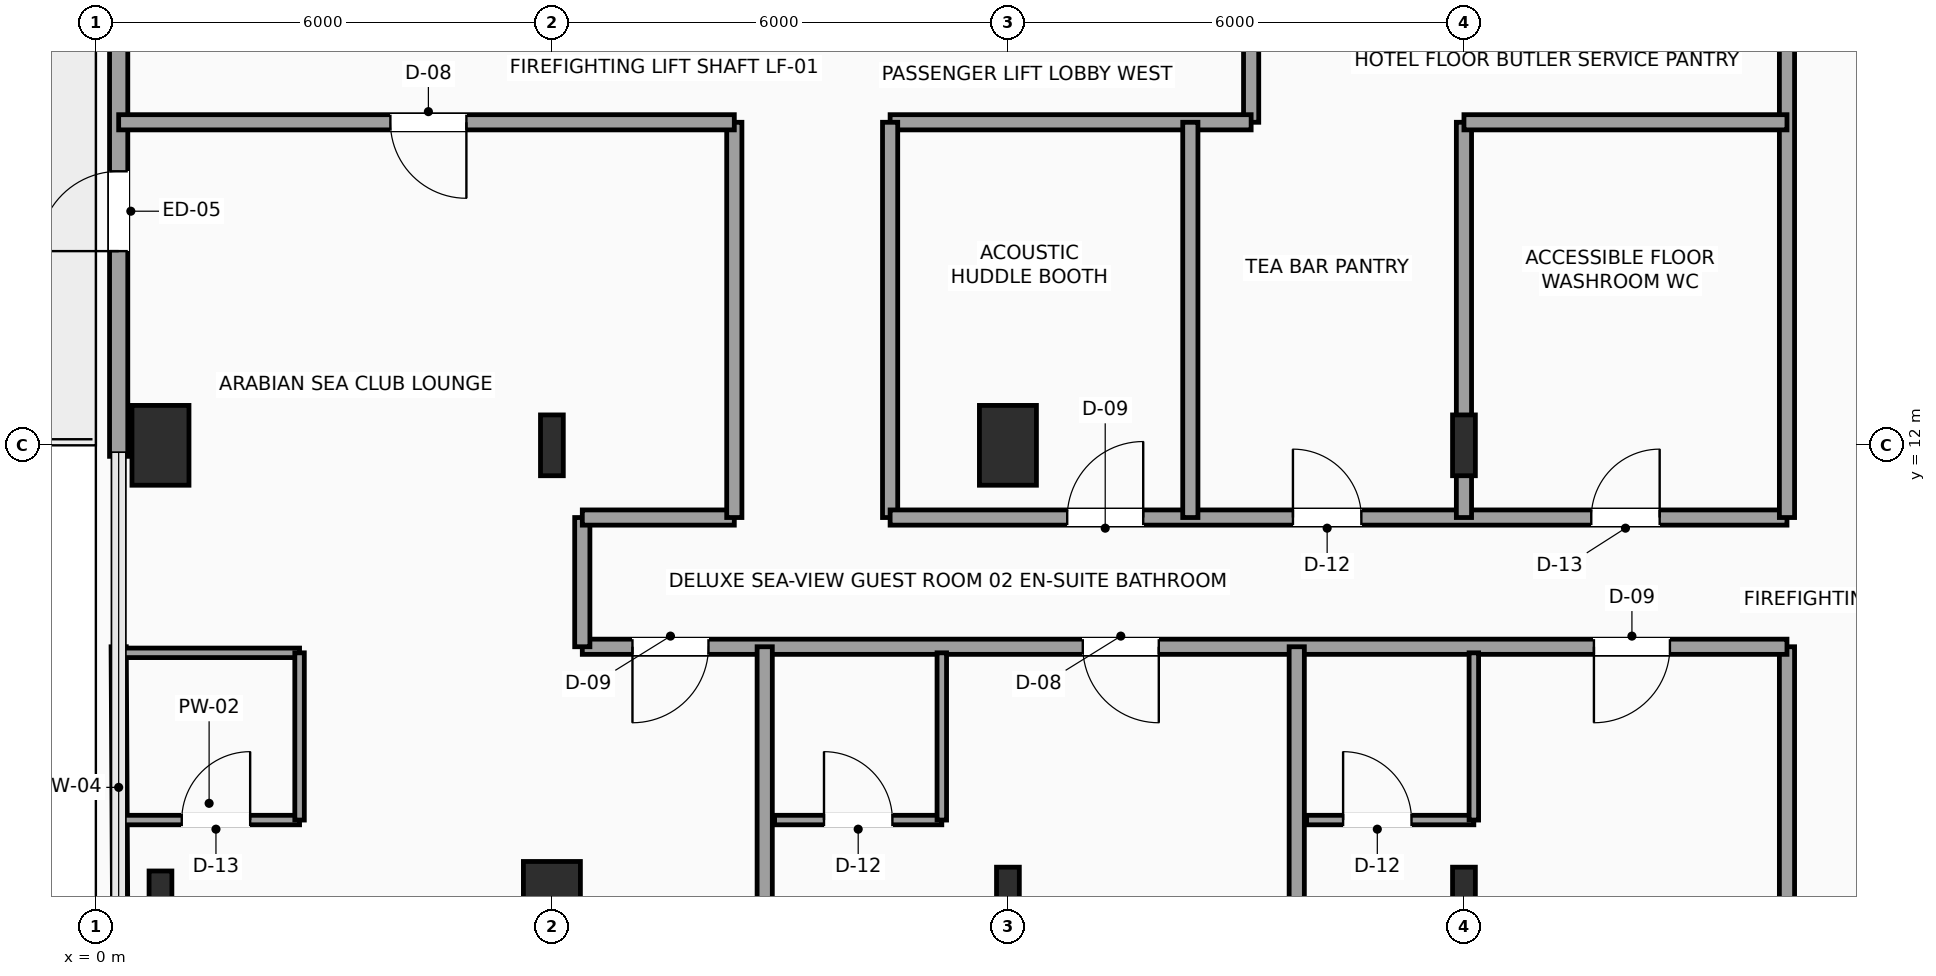
"""IFC4 building model, lengths in metres.
Left out: names, types, materials, properties, quantities, classifications, styles, units other than length and angle.
Written with IfcOpenShell. Run it as: python <this file> out.ifc"""

import sys

from ifc_helpers import new_model, si_unit, direction, frame, frame_2d, origin, origin_2d, place, context, subcontext, project, spatial, rectangle, i_section, extrude, element, fill, save


model = new_model("IFC4")
c1 = context("Model", 3, precision=1e-05, world=origin(), true_north=direction((0.0, 1.0)))
c2 = subcontext(c1, "Body", "Model", "MODEL_VIEW")
j1 = project(units=[si_unit("LENGTHUNIT", "METRE"), si_unit("PLANEANGLEUNIT", "RADIAN")], contexts=[c1])
p1 = place(None, origin())
s1 = spatial("IfcSite", under=j1, at=p1, CompositionType="ELEMENT")
p2 = place(p1, origin())
s2 = spatial("IfcBuilding", under=s1, at=p2, CompositionType="ELEMENT")
p3 = place(p2, frame((0.0, 0.0, 172.95)))
s3 = spatial("IfcBuildingStorey", under=s2, at=p3, CompositionType="ELEMENT", Elevation=172.95)
p4 = place(p3, frame((0.85, 6.0, 0.0), z_axis=(0.0, 0.0, 1.0), x_axis=(1.0, 0.0, 0.0)))
e1 = element("IfcColumn", 1, at=p4, inside=s3, PredefinedType="COLUMN", context=c2, shape_type="SweptSolid", body=[
    extrude(i_section(OverallWidth=0.3, OverallDepth=0.8, WebThickness=0.018, FlangeThickness=0.033, FilletRadius=0.03, at=origin_2d()), origin(), (0.0, 0.0, 1.0), 3.75),
])
for number, where, z_axis, x_axis in (
    (2, (0.85, 12.0, 0.0), (0.0, 0.0, 1.0), (1.0, 0.0, 0.0)),
    (3, (6.0, 6.0, 0.0), (0.0, 0.0, 1.0), (1.0, 0.0, 0.0)),
):
    element("IfcColumn", number, at=place(p3, frame(where, z_axis=z_axis, x_axis=x_axis)), inside=s3, PredefinedType="COLUMN", context=c2, shape_type="SweptSolid", body=[
        extrude(rectangle(XDim=0.75, YDim=1.05, at=origin_2d()), origin(), (0.0, 0.0, 1.0), 3.75),
    ])
p5 = place(p3, frame((6.0, 12.0, 0.0), z_axis=(0.0, 0.0, 1.0), x_axis=(1.0, 0.0, 0.0)))
e4 = element("IfcColumn", 4, at=p5, inside=s3, PredefinedType="COLUMN", context=c2, shape_type="SweptSolid", body=[
    extrude(i_section(OverallWidth=0.3, OverallDepth=0.8, WebThickness=0.018, FlangeThickness=0.033, FilletRadius=0.03, at=origin_2d()), origin(), (0.0, 0.0, 1.0), 3.75),
])
p6 = place(p3, frame((12.0, 6.0, 0.0), z_axis=(0.0, 0.0, 1.0), x_axis=(1.0, 0.0, 0.0)))
e5 = element("IfcColumn", 5, at=p6, inside=s3, PredefinedType="COLUMN", context=c2, shape_type="SweptSolid", body=[
    extrude(i_section(OverallWidth=0.3, OverallDepth=0.9, WebThickness=0.019, FlangeThickness=0.035, FilletRadius=0.03, at=origin_2d()), origin(), (0.0, 0.0, 1.0), 3.75),
])
p7 = place(p3, frame((12.0, 12.0, 0.0), z_axis=(0.0, 0.0, 1.0), x_axis=(1.0, 0.0, 0.0)))
e6 = element("IfcColumn", 6, at=p7, inside=s3, PredefinedType="COLUMN", context=c2, shape_type="SweptSolid", body=[
    extrude(rectangle(XDim=0.75, YDim=1.05, at=origin_2d()), origin(), (0.0, 0.0, 1.0), 3.75),
])
p8 = place(p3, frame((18.0, 6.0, 0.0), z_axis=(0.0, 0.0, 1.0), x_axis=(1.0, 0.0, 0.0)))
e7 = element("IfcColumn", 7, at=p8, inside=s3, PredefinedType="COLUMN", context=c2, shape_type="SweptSolid", body=[
    extrude(i_section(OverallWidth=0.3, OverallDepth=0.9, WebThickness=0.019, FlangeThickness=0.035, FilletRadius=0.03, at=origin_2d()), origin(), (0.0, 0.0, 1.0), 3.75),
])
p9 = place(p3, frame((18.0, 12.0, 0.0), z_axis=(0.0, 0.0, 1.0), x_axis=(1.0, 0.0, 0.0)))
e8 = element("IfcColumn", 8, at=p9, inside=s3, PredefinedType="COLUMN", context=c2, shape_type="SweptSolid", body=[
    extrude(i_section(OverallWidth=0.3, OverallDepth=0.8, WebThickness=0.018, FlangeThickness=0.033, FilletRadius=0.03, at=origin_2d()), origin(), (0.0, 0.0, 1.0), 3.75),
])
p10 = place(p3, frame((0.3, 11.855, 0.0), z_axis=(0.0, 0.0, 1.0), x_axis=(0.0, 1.0, 0.0)))
e9 = element("IfcWall", 9, at=p10, inside=s3, PredefinedType="SOLIDWALL", context=c2, shape_type="SweptSolid", body=[
    extrude(rectangle(XDim=9.29, YDim=0.24, at=frame_2d((4.645, 0.0))), origin(), (0.0, 0.0, 1.0), 3.54),
])
p11 = place(p10, frame((2.7, 0.0, 0.0)))
e10 = element("IfcOpeningElement", 10, at=p11, cuts=e9, PredefinedType="OPENING", context=c2, shape_type="SweptSolid", body=[
    extrude(rectangle(XDim=1.05, YDim=2.2, at=frame_2d((0.525, 1.1))), frame((0.0, 0.13, 0.0), z_axis=(0.0, -1.0, 0.0), x_axis=(1.0, 0.0, 0.0)), (0.0, 0.0, 1.0), 0.26),
])
p12 = place(p3, frame((22.25, 5.8, 0.0), z_axis=(0.0, 0.0, 1.0), x_axis=(0.0, 1.0, 0.0)))
e11 = element("IfcWall", 11, at=p12, inside=s3, PredefinedType="PARTITIONING", context=c2, shape_type="SweptSolid", body=[
    extrude(rectangle(XDim=3.55, YDim=0.2, at=frame_2d((1.775, 0.0))), origin(), (0.0, 0.0, 1.0), 3.54),
])
p13 = place(p3, frame((22.25, 9.35, 0.0), z_axis=(0.0, 0.0, 1.0), x_axis=(-1.0, 0.0, 0.0)))
e12 = element("IfcWall", 12, at=p13, inside=s3, PredefinedType="PARTITIONING", context=c2, shape_type="SweptSolid", body=[
    extrude(rectangle(XDim=15.85, YDim=0.2, at=frame_2d((7.925, 0.0))), origin(), (0.0, 0.0, 1.0), 3.54),
])
p14 = place(p13, frame((14.19, 0.0, 0.0)))
e13 = element("IfcOpeningElement", 13, at=p14, cuts=e12, PredefinedType="OPENING", context=c2, shape_type="SweptSolid", body=[
    extrude(rectangle(XDim=1.0, YDim=2.2, at=frame_2d((0.5, 1.1))), frame((0.0, 0.11, 0.0), z_axis=(0.0, -1.0, 0.0), x_axis=(1.0, 0.0, 0.0)), (0.0, 0.0, 1.0), 0.22),
])
p15 = place(p13, frame((8.265, 0.0, 0.0)))
e14 = element("IfcOpeningElement", 14, at=p15, cuts=e12, PredefinedType="OPENING", context=c2, shape_type="SweptSolid", body=[
    extrude(rectangle(XDim=1.0, YDim=2.2, at=frame_2d((0.5, 1.1))), frame((0.0, 0.11, 0.0), z_axis=(0.0, -1.0, 0.0), x_axis=(1.0, 0.0, 0.0)), (0.0, 0.0, 1.0), 0.22),
])
p16 = place(p13, frame((1.54, 0.0, 0.0)))
e15 = element("IfcOpeningElement", 15, at=p16, cuts=e12, PredefinedType="OPENING", context=c2, shape_type="SweptSolid", body=[
    extrude(rectangle(XDim=1.0, YDim=2.2, at=frame_2d((0.5, 1.1))), frame((0.0, 0.11, 0.0), z_axis=(0.0, -1.0, 0.0), x_axis=(1.0, 0.0, 0.0)), (0.0, 0.0, 1.0), 0.22),
])
p17 = place(p3, frame((6.4, 9.35, 0.0), z_axis=(0.0, 0.0, 1.0), x_axis=(0.0, 1.0, 0.0)))
e16 = element("IfcWall", 16, at=p17, inside=s3, PredefinedType="PARTITIONING", context=c2, shape_type="SweptSolid", body=[
    extrude(rectangle(XDim=1.7, YDim=0.2, at=frame_2d((0.85, 0.0))), origin(), (0.0, 0.0, 1.0), 3.54),
])
p18 = place(p3, frame((6.4, 11.05, 0.0), z_axis=(0.0, 0.0, 1.0), x_axis=(1.0, 0.0, 0.0)))
e17 = element("IfcWall", 17, at=p18, inside=s3, PredefinedType="PARTITIONING", context=c2, shape_type="SweptSolid", body=[
    extrude(rectangle(XDim=2.0, YDim=0.2, at=frame_2d((1.0, 0.0))), origin(), (0.0, 0.0, 1.0), 3.54),
])
p19 = place(p3, frame((8.4, 11.05, 0.0), z_axis=(0.0, 0.0, 1.0), x_axis=(0.0, 1.0, 0.0)))
e18 = element("IfcWall", 18, at=p19, inside=s3, PredefinedType="PARTITIONING", context=c2, shape_type="SweptSolid", body=[
    extrude(rectangle(XDim=5.2, YDim=0.2, at=frame_2d((2.6, 0.0))), origin(), (0.0, 0.0, 1.0), 3.54),
])
p20 = place(p3, frame((8.4, 16.25, 0.0), z_axis=(0.0, 0.0, 1.0), x_axis=(-1.0, 0.0, 0.0)))
e19 = element("IfcWall", 19, at=p20, inside=s3, PredefinedType="PARTITIONING", context=c2, shape_type="SweptSolid", body=[
    extrude(rectangle(XDim=8.1, YDim=0.2, at=frame_2d((4.05, 0.0))), origin(), (0.0, 0.0, 1.0), 3.54),
])
p21 = place(p20, frame((3.525, 0.0, 0.0)))
e20 = element("IfcOpeningElement", 20, at=p21, cuts=e19, PredefinedType="OPENING", context=c2, shape_type="SweptSolid", body=[
    extrude(rectangle(XDim=1.0, YDim=2.2, at=frame_2d((0.5, 1.1))), frame((0.0, 0.11, 0.0), z_axis=(0.0, -1.0, 0.0), x_axis=(1.0, 0.0, 0.0)), (0.0, 0.0, 1.0), 0.22),
])
p22 = place(p3, frame((15.2, 17.95, 0.0), z_axis=(0.0, 0.0, 1.0), x_axis=(0.0, -1.0, 0.0)))
e21 = element("IfcWall", 21, at=p22, inside=s3, PredefinedType="PARTITIONING", context=c2, shape_type="SweptSolid", body=[
    extrude(rectangle(XDim=1.7, YDim=0.2, at=frame_2d((0.85, 0.0))), origin(), (0.0, 0.0, 1.0), 3.54),
])
p23 = place(p3, frame((15.2, 16.25, 0.0), z_axis=(0.0, 0.0, 1.0), x_axis=(-1.0, 0.0, 0.0)))
e22 = element("IfcWall", 22, at=p23, inside=s3, PredefinedType="PARTITIONING", context=c2, shape_type="SweptSolid", body=[
    extrude(rectangle(XDim=4.75, YDim=0.2, at=frame_2d((2.375, 0.0))), origin(), (0.0, 0.0, 1.0), 3.54),
])
p24 = place(p3, frame((10.45, 16.25, 0.0), z_axis=(0.0, 0.0, 1.0), x_axis=(0.0, -1.0, 0.0)))
e23 = element("IfcWall", 23, at=p24, inside=s3, PredefinedType="PARTITIONING", context=c2, shape_type="SweptSolid", body=[
    extrude(rectangle(XDim=5.2, YDim=0.2, at=frame_2d((2.6, 0.0))), origin(), (0.0, 0.0, 1.0), 3.54),
])
p25 = place(p3, frame((10.45, 11.05, 0.0), z_axis=(0.0, 0.0, 1.0), x_axis=(1.0, 0.0, 0.0)))
e24 = element("IfcWall", 24, at=p25, inside=s3, PredefinedType="PARTITIONING", context=c2, shape_type="SweptSolid", body=[
    extrude(rectangle(XDim=11.8, YDim=0.2, at=frame_2d((5.9, 0.0))), origin(), (0.0, 0.0, 1.0), 3.54),
])
p26 = place(p25, frame((2.33, 0.0, 0.0)))
e25 = element("IfcOpeningElement", 25, at=p26, cuts=e24, PredefinedType="OPENING", context=c2, shape_type="SweptSolid", body=[
    extrude(rectangle(XDim=1.0, YDim=2.2, at=frame_2d((0.5, 1.1))), frame((0.0, 0.11, 0.0), z_axis=(0.0, -1.0, 0.0), x_axis=(1.0, 0.0, 0.0)), (0.0, 0.0, 1.0), 0.22),
])
p27 = place(p25, frame((5.3, 0.0, 0.0)))
e26 = element("IfcOpeningElement", 26, at=p27, cuts=e24, PredefinedType="OPENING", context=c2, shape_type="SweptSolid", body=[
    extrude(rectangle(XDim=0.9, YDim=2.1, at=frame_2d((0.45, 1.05))), frame((0.0, 0.11, 0.0), z_axis=(0.0, -1.0, 0.0), x_axis=(1.0, 0.0, 0.0)), (0.0, 0.0, 1.0), 0.22),
])
p28 = place(p25, frame((9.225, 0.0, 0.0)))
e27 = element("IfcOpeningElement", 27, at=p28, cuts=e24, PredefinedType="OPENING", context=c2, shape_type="SweptSolid", body=[
    extrude(rectangle(XDim=0.9, YDim=2.1, at=frame_2d((0.45, 1.05))), frame((0.0, 0.11, 0.0), z_axis=(0.0, -1.0, 0.0), x_axis=(1.0, 0.0, 0.0)), (0.0, 0.0, 1.0), 0.22),
])
p29 = place(p3, frame((22.25, 11.05, 0.0), z_axis=(0.0, 0.0, 1.0), x_axis=(0.0, 1.0, 0.0)))
e28 = element("IfcWall", 28, at=p29, inside=s3, PredefinedType="PARTITIONING", context=c2, shape_type="SweptSolid", body=[
    extrude(rectangle(XDim=19.2, YDim=0.2, at=frame_2d((9.6, 0.0))), origin(), (0.0, 0.0, 1.0), 3.54),
])
p30 = place(p3, frame((14.4, 11.05, 0.0), z_axis=(0.0, 0.0, 1.0), x_axis=(0.0, 1.0, 0.0)))
e29 = element("IfcWall", 29, at=p30, inside=s3, PredefinedType="PARTITIONING", context=c2, shape_type="SweptSolid", body=[
    extrude(rectangle(XDim=5.2, YDim=0.2, at=frame_2d((2.6, 0.0))), origin(), (0.0, 0.0, 1.0), 3.54),
])
p31 = place(p3, frame((18.0, 11.05, 0.0), z_axis=(0.0, 0.0, 1.0), x_axis=(0.0, 1.0, 0.0)))
e30 = element("IfcWall", 30, at=p31, inside=s3, PredefinedType="PARTITIONING", context=c2, shape_type="SweptSolid", body=[
    extrude(rectangle(XDim=5.2, YDim=0.2, at=frame_2d((2.6, 0.0))), origin(), (0.0, 0.0, 1.0), 3.132),
])
p32 = place(p3, frame((18.0, 16.25, 0.0), z_axis=(0.0, 0.0, 1.0), x_axis=(1.0, 0.0, 0.0)))
e31 = element("IfcWall", 31, at=p32, inside=s3, PredefinedType="PARTITIONING", context=c2, shape_type="SweptSolid", body=[
    extrude(rectangle(XDim=4.25, YDim=0.2, at=frame_2d((2.125, 0.0))), origin(), (0.0, 0.0, 1.0), 3.54),
])
p33 = place(p3, frame((0.35, 0.35, 0.0), z_axis=(0.0, 0.0, 1.0), x_axis=(-0.005560894919, 0.999984538104, 0.0)))
e32 = element("IfcWall", 32, at=p33, inside=s3, PredefinedType="PARTITIONING", context=c2, shape_type="SweptSolid", body=[
    extrude(rectangle(XDim=9.0, YDim=0.2, at=frame_2d((4.5, 0.0))), origin(), (0.0, 0.0, 1.0), 3.54),
])
p34 = place(p3, frame((8.8, 0.3, 0.0), z_axis=(0.0, 0.0, 1.0), x_axis=(0.0, 1.0, 0.0)))
e33 = element("IfcWall", 33, at=p34, inside=s3, PredefinedType="PARTITIONING", context=c2, shape_type="SweptSolid", body=[
    extrude(rectangle(XDim=9.05, YDim=0.2, at=frame_2d((4.525, 0.0))), origin(), (0.0, 0.0, 1.0), 3.54),
])
p35 = place(p3, frame((0.3, 7.07, 0.0), z_axis=(0.0, 0.0, 1.0), x_axis=(1.0, 0.0, 0.0)))
e34 = element("IfcWall", 34, at=p35, inside=s3, PredefinedType="PARTITIONING", context=c2, shape_type="SweptSolid", body=[
    extrude(rectangle(XDim=2.38, YDim=0.125, at=frame_2d((1.19, 0.0))), origin(), (0.0, 0.0, 1.0), 3.54),
])
p36 = place(p35, frame((0.83, 0.0, 0.0)))
e35 = element("IfcOpeningElement", 35, at=p36, cuts=e34, PredefinedType="OPENING", context=c2, shape_type="SweptSolid", body=[
    extrude(rectangle(XDim=0.9, YDim=2.1, at=frame_2d((0.45, 1.05))), frame((0.0, 0.073, 0.0), z_axis=(0.0, -1.0, 0.0), x_axis=(1.0, 0.0, 0.0)), (0.0, 0.0, 1.0), 0.145),
])
p37 = place(p3, frame((0.3, 9.27, 0.0), z_axis=(0.0, 0.0, 1.0), x_axis=(1.0, 0.0, 0.0)))
e36 = element("IfcWall", 36, at=p37, inside=s3, PredefinedType="PARTITIONING", context=c2, shape_type="SweptSolid", body=[
    extrude(rectangle(XDim=2.38, YDim=0.125, at=frame_2d((1.19, 0.0))), origin(), (0.0, 0.0, 1.0), 3.54),
])
p38 = place(p3, frame((2.68, 7.07, 0.0), z_axis=(0.0, 0.0, 1.0), x_axis=(0.0, 1.0, 0.0)))
e37 = element("IfcWall", 37, at=p38, inside=s3, PredefinedType="PARTITIONING", context=c2, shape_type="SweptSolid", body=[
    extrude(rectangle(XDim=2.2, YDim=0.125, at=frame_2d((1.1, 0.0))), origin(), (0.0, 0.0, 1.0), 3.54),
])
p39 = place(p3, frame((15.8, 0.3, 0.0), z_axis=(0.0, 0.0, 1.0), x_axis=(0.0, 1.0, 0.0)))
e38 = element("IfcWall", 38, at=p39, inside=s3, PredefinedType="PARTITIONING", context=c2, shape_type="SweptSolid", body=[
    extrude(rectangle(XDim=9.05, YDim=0.2, at=frame_2d((4.525, 0.0))), origin(), (0.0, 0.0, 1.0), 3.54),
])
p40 = place(p3, frame((8.93, 7.07, 0.0), z_axis=(0.0, 0.0, 1.0), x_axis=(1.0, 0.0, 0.0)))
e39 = element("IfcWall", 39, at=p40, inside=s3, PredefinedType="PARTITIONING", context=c2, shape_type="SweptSolid", body=[
    extrude(rectangle(XDim=2.2, YDim=0.125, at=frame_2d((1.1, 0.0))), origin(), (0.0, 0.0, 1.0), 3.54),
])
p41 = place(p40, frame((0.65, 0.0, 0.0)))
e40 = element("IfcOpeningElement", 40, at=p41, cuts=e39, PredefinedType="OPENING", context=c2, shape_type="SweptSolid", body=[
    extrude(rectangle(XDim=0.9, YDim=2.1, at=frame_2d((0.45, 1.05))), frame((0.0, 0.073, 0.0), z_axis=(0.0, -1.0, 0.0), x_axis=(1.0, 0.0, 0.0)), (0.0, 0.0, 1.0), 0.145),
])
p42 = place(p3, frame((11.13, 7.07, 0.0), z_axis=(0.0, 0.0, 1.0), x_axis=(0.0, 1.0, 0.0)))
e41 = element("IfcWall", 41, at=p42, inside=s3, PredefinedType="PARTITIONING", context=c2, shape_type="SweptSolid", body=[
    extrude(rectangle(XDim=2.2, YDim=0.125, at=frame_2d((1.1, 0.0))), origin(), (0.0, 0.0, 1.0), 3.54),
])
p43 = place(p3, frame((15.93, 7.07, 0.0), z_axis=(0.0, 0.0, 1.0), x_axis=(1.0, 0.0, 0.0)))
e42 = element("IfcWall", 42, at=p43, inside=s3, PredefinedType="PARTITIONING", context=c2, shape_type="SweptSolid", body=[
    extrude(rectangle(XDim=2.2, YDim=0.125, at=frame_2d((1.1, 0.0))), origin(), (0.0, 0.0, 1.0), 3.54),
])
p44 = place(p43, frame((0.48, 0.0, 0.0)))
e43 = element("IfcOpeningElement", 43, at=p44, cuts=e42, PredefinedType="OPENING", context=c2, shape_type="SweptSolid", body=[
    extrude(rectangle(XDim=0.9, YDim=2.1, at=frame_2d((0.45, 1.05))), frame((0.0, 0.073, 0.0), z_axis=(0.0, -1.0, 0.0), x_axis=(1.0, 0.0, 0.0)), (0.0, 0.0, 1.0), 0.145),
])
p45 = place(p3, frame((18.13, 7.07, 0.0), z_axis=(0.0, 0.0, 1.0), x_axis=(0.0, 1.0, 0.0)))
e44 = element("IfcWall", 44, at=p45, inside=s3, PredefinedType="PARTITIONING", context=c2, shape_type="SweptSolid", body=[
    extrude(rectangle(XDim=2.2, YDim=0.125, at=frame_2d((1.1, 0.0))), origin(), (0.0, 0.0, 1.0), 3.132),
])
p46 = place(p11, origin())
e45 = element("IfcDoor", 45, at=p46, inside=s3, OperationType="SINGLE_SWING_LEFT", PredefinedType="DOOR", context=c2, shape_type="SweptSolid", body=[
    extrude(rectangle(XDim=1.05, YDim=2.2, at=frame_2d((0.525, 1.1))), frame((0.0, 0.025, 0.0), z_axis=(0.0, -1.0, 0.0), x_axis=(1.0, 0.0, 0.0)), (0.0, 0.0, 1.0), 0.05),
])
fill(e10, e45)
p47 = place(p14, origin())
e46 = element("IfcDoor", 46, at=p47, inside=s3, OperationType="SINGLE_SWING_RIGHT", PredefinedType="DOOR", context=c2, shape_type="SweptSolid", body=[
    extrude(rectangle(XDim=1.0, YDim=2.2, at=frame_2d((0.5, 1.1))), frame((0.0, 0.025, 0.0), z_axis=(0.0, -1.0, 0.0), x_axis=(1.0, 0.0, 0.0)), (0.0, 0.0, 1.0), 0.05),
])
fill(e13, e46)
p48 = place(p15, origin())
e47 = element("IfcDoor", 47, at=p48, inside=s3, OperationType="SINGLE_SWING_LEFT", PredefinedType="DOOR", context=c2, shape_type="SweptSolid", body=[
    extrude(rectangle(XDim=1.0, YDim=2.2, at=frame_2d((0.5, 1.1))), frame((0.0, 0.025, 0.0), z_axis=(0.0, -1.0, 0.0), x_axis=(1.0, 0.0, 0.0)), (0.0, 0.0, 1.0), 0.05),
])
fill(e14, e47)
p49 = place(p16, origin())
e48 = element("IfcDoor", 48, at=p49, inside=s3, OperationType="SINGLE_SWING_RIGHT", PredefinedType="DOOR", context=c2, shape_type="SweptSolid", body=[
    extrude(rectangle(XDim=1.0, YDim=2.2, at=frame_2d((0.5, 1.1))), frame((0.0, 0.025, 0.0), z_axis=(0.0, -1.0, 0.0), x_axis=(1.0, 0.0, 0.0)), (0.0, 0.0, 1.0), 0.05),
])
fill(e15, e48)
p50 = place(p21, origin())
e49 = element("IfcDoor", 49, at=p50, inside=s3, OperationType="SINGLE_SWING_LEFT", PredefinedType="DOOR", context=c2, shape_type="SweptSolid", body=[
    extrude(rectangle(XDim=1.0, YDim=2.2, at=frame_2d((0.5, 1.1))), frame((0.0, 0.025, 0.0), z_axis=(0.0, -1.0, 0.0), x_axis=(1.0, 0.0, 0.0)), (0.0, 0.0, 1.0), 0.05),
])
fill(e20, e49)
p51 = place(p26, origin())
e50 = element("IfcDoor", 50, at=p51, inside=s3, OperationType="SINGLE_SWING_RIGHT", PredefinedType="DOOR", context=c2, shape_type="SweptSolid", body=[
    extrude(rectangle(XDim=1.0, YDim=2.2, at=frame_2d((0.5, 1.1))), frame((0.0, 0.025, 0.0), z_axis=(0.0, -1.0, 0.0), x_axis=(1.0, 0.0, 0.0)), (0.0, 0.0, 1.0), 0.05),
])
fill(e25, e50)
p52 = place(p27, origin())
e51 = element("IfcDoor", 51, at=p52, inside=s3, OperationType="SINGLE_SWING_LEFT", PredefinedType="DOOR", context=c2, shape_type="SweptSolid", body=[
    extrude(rectangle(XDim=0.9, YDim=2.1, at=frame_2d((0.45, 1.05))), frame((0.0, 0.025, 0.0), z_axis=(0.0, -1.0, 0.0), x_axis=(1.0, 0.0, 0.0)), (0.0, 0.0, 1.0), 0.05),
])
fill(e26, e51)
p53 = place(p28, origin())
e52 = element("IfcDoor", 52, at=p53, inside=s3, OperationType="SINGLE_SWING_RIGHT", PredefinedType="DOOR", context=c2, shape_type="SweptSolid", body=[
    extrude(rectangle(XDim=0.9, YDim=2.1, at=frame_2d((0.45, 1.05))), frame((0.0, 0.025, 0.0), z_axis=(0.0, -1.0, 0.0), x_axis=(1.0, 0.0, 0.0)), (0.0, 0.0, 1.0), 0.05),
])
fill(e27, e52)
p54 = place(p36, origin())
e53 = element("IfcDoor", 53, at=p54, inside=s3, OperationType="SINGLE_SWING_RIGHT", PredefinedType="DOOR", context=c2, shape_type="SweptSolid", body=[
    extrude(rectangle(XDim=0.9, YDim=2.1, at=frame_2d((0.45, 1.05))), frame((0.0, 0.025, 0.0), z_axis=(0.0, -1.0, 0.0), x_axis=(1.0, 0.0, 0.0)), (0.0, 0.0, 1.0), 0.05),
])
fill(e35, e53)
p55 = place(p41, origin())
e54 = element("IfcDoor", 54, at=p55, inside=s3, OperationType="SINGLE_SWING_LEFT", PredefinedType="DOOR", context=c2, shape_type="SweptSolid", body=[
    extrude(rectangle(XDim=0.9, YDim=2.1, at=frame_2d((0.45, 1.05))), frame((0.0, 0.025, 0.0), z_axis=(0.0, -1.0, 0.0), x_axis=(1.0, 0.0, 0.0)), (0.0, 0.0, 1.0), 0.05),
])
fill(e40, e54)
p56 = place(p44, origin())
e55 = element("IfcDoor", 55, at=p56, inside=s3, OperationType="SINGLE_SWING_LEFT", PredefinedType="DOOR", context=c2, shape_type="SweptSolid", body=[
    extrude(rectangle(XDim=0.9, YDim=2.1, at=frame_2d((0.45, 1.05))), frame((0.0, 0.025, 0.0), z_axis=(0.0, -1.0, 0.0), x_axis=(1.0, 0.0, 0.0)), (0.0, 0.0, 1.0), 0.05),
])
fill(e43, e55)
save(model, sys.argv[1])
